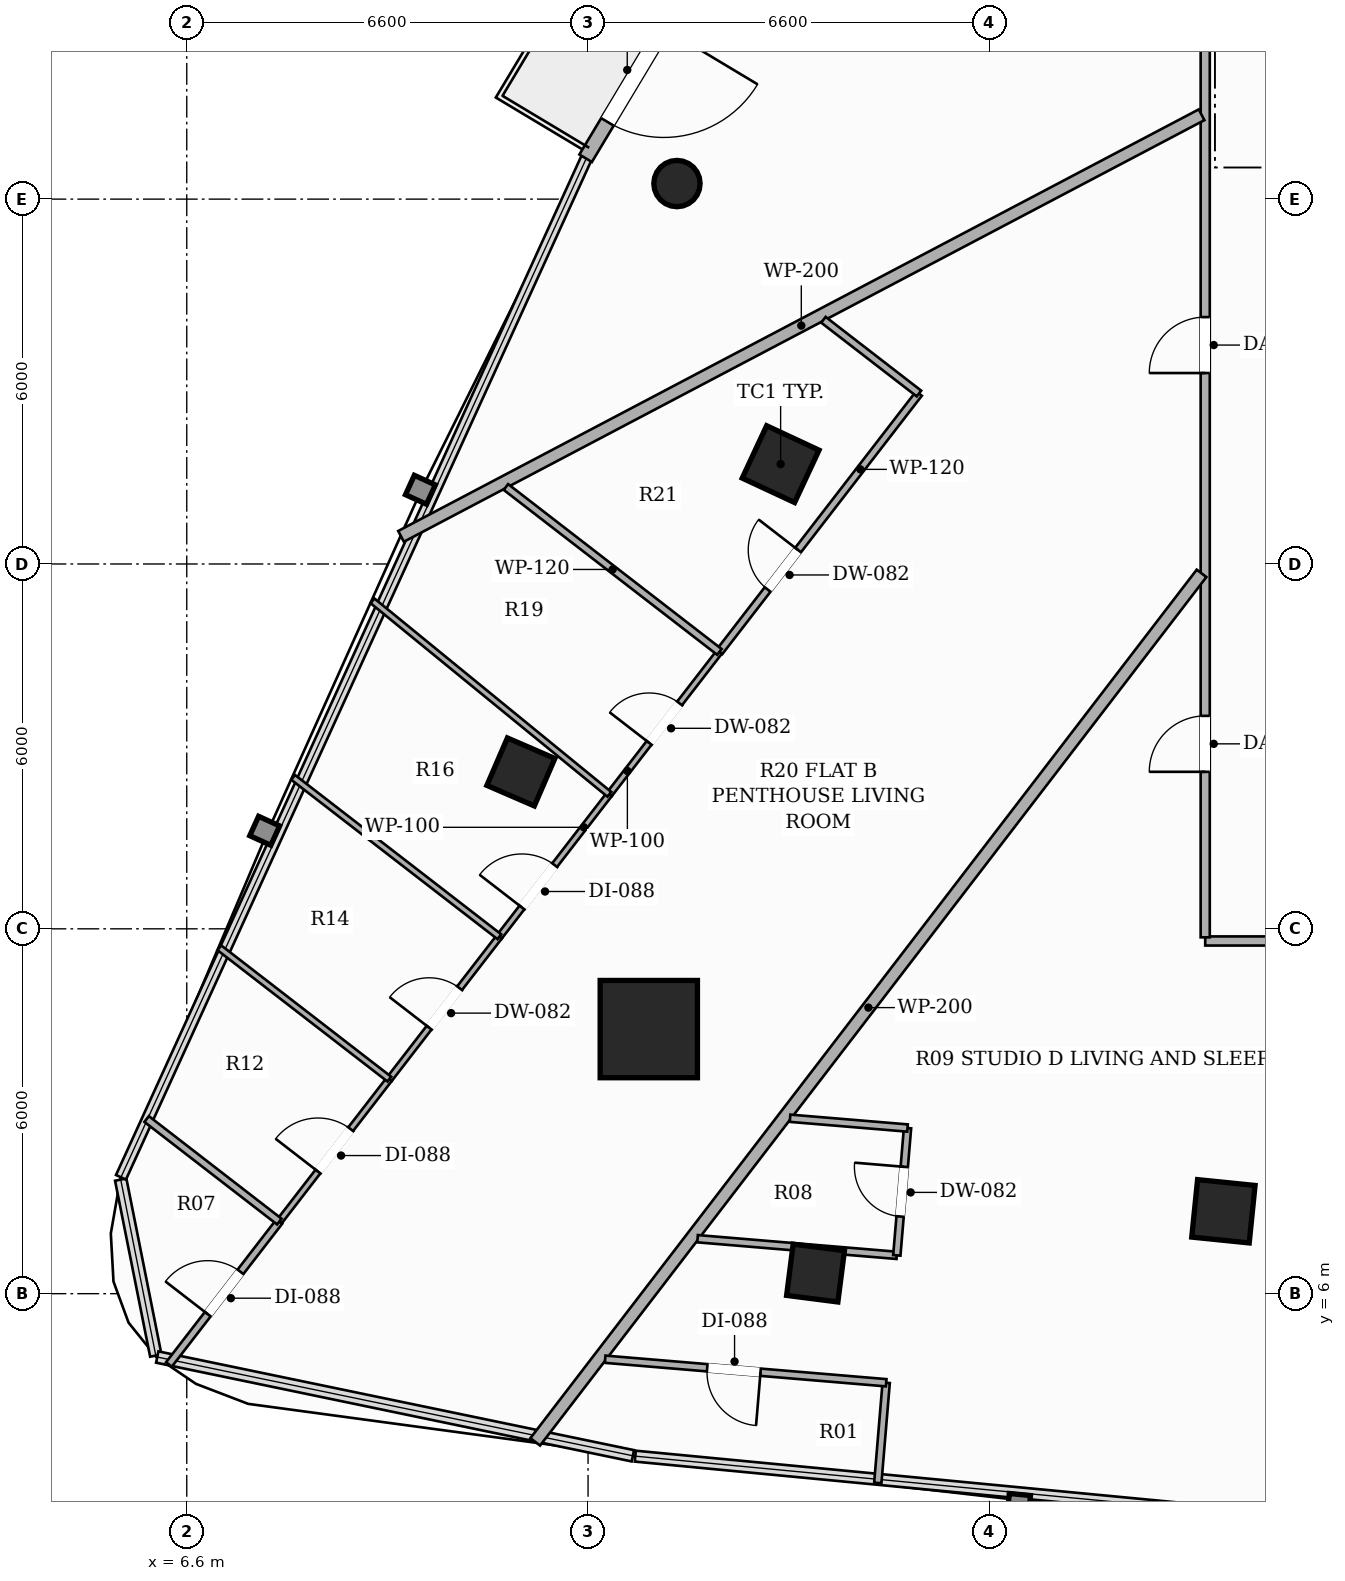
"""IFC4 building model, lengths in metres.
Left out: names, types, materials, properties, quantities, classifications, styles, units other than length and angle.
Written with IfcOpenShell. Run it as: python <this file> out.ifc"""

import sys

from ifc_helpers import new_model, si_unit, direction, frame, frame_2d, origin, origin_2d, place, context, subcontext, project, spatial, rectangle, hollow_rectangle, hollow_circle, extrude, element, fill, save


model = new_model("IFC4")
c1 = context("Model", 3, precision=1e-05, world=origin(), true_north=direction((0.0, 1.0)))
c2 = subcontext(c1, "Body", "Model", "MODEL_VIEW")
j1 = project(units=[si_unit("LENGTHUNIT", "METRE"), si_unit("PLANEANGLEUNIT", "RADIAN")], contexts=[c1])
p1 = place(None, origin())
s1 = spatial("IfcSite", under=j1, at=p1, CompositionType="ELEMENT")
p2 = place(p1, origin())
s2 = spatial("IfcBuilding", under=s1, at=p2, CompositionType="ELEMENT")
p3 = place(p2, frame((0.0, 0.0, 80.75)))
s3 = spatial("IfcBuildingStorey", under=s2, at=p3, CompositionType="ELEMENT", Elevation=80.75)
p4 = place(p3, frame((14.199, 10.351, 0.0), z_axis=(0.0, 0.0, 1.0), x_axis=(1.0, 0.0, 0.0)))
e1 = element("IfcColumn", 1, at=p4, inside=s3, PredefinedType="COLUMN", context=c2, shape_type="SweptSolid", body=[
    extrude(hollow_rectangle(XDim=1.6, YDim=1.6, WallThickness=0.05, at=origin_2d()), origin(), (0.0, 0.0, 1.0), 3.3),
])
for number, where, z_axis, x_axis in (
    (2, (16.367, 19.642, 0.0), (0.0, 0.0, 1.0), (0.423, 0.906, 0.0)),
    (3, (23.649, 7.355, 0.0), (0.0, 0.0, 1.0), (-0.995, 0.101, 0.0)),
):
    element("IfcColumn", number, at=place(p3, frame(where, z_axis=z_axis, x_axis=x_axis)), inside=s3, PredefinedType="COLUMN", context=c2, shape_type="SweptSolid", body=[
        extrude(hollow_rectangle(XDim=0.95, YDim=0.95, WallThickness=0.032, at=origin_2d()), origin(), (0.0, 0.0, 1.0), 3.3),
    ])
for number, where, z_axis, x_axis in (
    (4, (12.095, 14.58, 0.0), (0.0, 0.0, 1.0), (0.397, 0.918, 0.0)),
    (5, (16.941, 6.339, 0.0), (0.0, 0.0, 1.0), (-0.992, 0.127, 0.0)),
):
    element("IfcColumn", number, at=place(p3, frame(where, z_axis=z_axis, x_axis=x_axis)), inside=s3, PredefinedType="COLUMN", context=c2, shape_type="SweptSolid", body=[
        extrude(hollow_rectangle(XDim=0.85, YDim=0.85, WallThickness=0.028, at=origin_2d()), origin(), (0.0, 0.0, 1.0), 3.3),
    ])
p5 = place(p3, frame((14.662, 24.256, 0.0), z_axis=(0.0, 0.0, 1.0), x_axis=(1.0, 0.0, 0.0)))
e6 = element("IfcColumn", 6, at=p5, inside=s3, PredefinedType="COLUMN", context=c2, shape_type="SweptSolid", body=[
    extrude(hollow_circle(Radius=0.381, WallThickness=0.022, at=origin_2d()), origin(), (0.0, 0.0, 1.0), 3.3),
])
p6 = place(p3, frame((19.576, 35.37, 0.0), z_axis=(0.0, 0.0, 1.0), x_axis=(-0.514331693128, -0.85759134175, 0.0)))
e7 = element("IfcWall", 7, at=p6, inside=s3, PredefinedType="SOLIDWALL", context=c2, shape_type="SweptSolid", body=[
    extrude(rectangle(XDim=12.474, YDim=0.24, at=frame_2d((6.237, 0.0))), origin(), (0.0, 0.0, 1.0), 2.624),
])
p7 = place(p6, frame((9.977, 0.0, 0.0)))
e8 = element("IfcOpeningElement", 8, at=p7, cuts=e7, PredefinedType="OPENING", context=c2, shape_type="SweptSolid", body=[
    extrude(rectangle(XDim=1.8, YDim=2.2, at=frame_2d((0.9, 1.1))), frame((0.0, 0.13, 0.0), z_axis=(0.0, -1.0, 0.0), x_axis=(1.0, 0.0, 0.0)), (0.0, 0.0, 1.0), 0.26),
])
p8 = place(p3, frame((42.59, 11.8, 0.0), z_axis=(0.0, 0.0, 1.0), x_axis=(-1.0, 0.0, 0.0)))
e9 = element("IfcWall", 9, at=p8, inside=s3, PredefinedType="PARTITIONING", context=c2, shape_type="SweptSolid", body=[
    extrude(rectangle(XDim=19.24, YDim=0.15, at=frame_2d((9.62, 0.0))), origin(), (0.0, 0.0, 1.0), 2.669),
])
p9 = place(p8, frame((9.24, 0.0, 0.0)))
e10 = element("IfcOpeningElement", 10, at=p9, cuts=e9, PredefinedType="OPENING", context=c2, shape_type="SweptSolid", body=[
    extrude(rectangle(XDim=0.88, YDim=2.1, at=frame_2d((0.44, 1.05))), frame((0.0, 0.085, 0.0), z_axis=(0.0, -1.0, 0.0), x_axis=(1.0, 0.0, 0.0)), (0.0, 0.0, 1.0), 0.17),
])
p10 = place(p8, frame((2.174, 0.0, 0.0)))
e11 = element("IfcOpeningElement", 11, at=p10, cuts=e9, PredefinedType="OPENING", context=c2, shape_type="SweptSolid", body=[
    extrude(rectangle(XDim=0.88, YDim=2.1, at=frame_2d((0.44, 1.05))), frame((0.0, 0.085, 0.0), z_axis=(0.0, -1.0, 0.0), x_axis=(1.0, 0.0, 0.0)), (0.0, 0.0, 1.0), 0.17),
])
p11 = place(p3, frame((23.35, 11.86, 0.0), z_axis=(0.0, 0.0, 1.0), x_axis=(0.0, 1.0, 0.0)))
e12 = element("IfcWall", 12, at=p11, inside=s3, PredefinedType="PARTITIONING", context=c2, shape_type="SweptSolid", body=[
    extrude(rectangle(XDim=25.04, YDim=0.15, at=frame_2d((12.52, 0.0))), origin(), (0.0, 0.0, 1.0), 2.413),
])
p12 = place(p11, frame((18.695, 0.0, 0.0)))
e13 = element("IfcOpeningElement", 13, at=p12, cuts=e12, PredefinedType="OPENING", context=c2, shape_type="SweptSolid", body=[
    extrude(rectangle(XDim=0.88, YDim=2.1, at=frame_2d((0.44, 1.05))), frame((0.0, 0.085, 0.0), z_axis=(0.0, -1.0, 0.0), x_axis=(1.0, 0.0, 0.0)), (0.0, 0.0, 1.0), 0.17),
])
p13 = place(p11, frame((9.28, 0.0, 0.0)))
e14 = element("IfcOpeningElement", 14, at=p13, cuts=e12, PredefinedType="OPENING", context=c2, shape_type="SweptSolid", body=[
    extrude(rectangle(XDim=0.92, YDim=2.15, at=frame_2d((0.46, 1.075))), frame((0.0, 0.085, 0.0), z_axis=(0.0, -1.0, 0.0), x_axis=(1.0, 0.0, 0.0)), (0.0, 0.0, 1.0), 0.17),
])
p14 = place(p11, frame((2.722, 0.0, 0.0)))
e15 = element("IfcOpeningElement", 15, at=p14, cuts=e12, PredefinedType="OPENING", context=c2, shape_type="SweptSolid", body=[
    extrude(rectangle(XDim=0.92, YDim=2.15, at=frame_2d((0.46, 1.075))), frame((0.0, 0.085, 0.0), z_axis=(0.0, -1.0, 0.0), x_axis=(1.0, 0.0, 0.0)), (0.0, 0.0, 1.0), 0.17),
])
p15 = place(p3, frame((23.29, 25.387, 0.0), z_axis=(0.0, 0.0, 1.0), x_axis=(-0.884824599801, -0.465924272373, 0.0)))
e16 = element("IfcWall", 16, at=p15, inside=s3, PredefinedType="PARTITIONING", context=c2, shape_type="SweptSolid", body=[
    extrude(rectangle(XDim=14.88, YDim=0.2, at=frame_2d((7.44, 0.0))), origin(), (0.0, 0.0, 1.0), 2.413),
])
p16 = place(p3, frame((23.29, 17.846, 0.0), z_axis=(0.0, 0.0, 1.0), x_axis=(-0.608736412859, -0.793372535232, 0.0)))
e17 = element("IfcWall", 17, at=p16, inside=s3, PredefinedType="PARTITIONING", context=c2, shape_type="SweptSolid", body=[
    extrude(rectangle(XDim=18.003, YDim=0.2, at=frame_2d((9.001, 0.0))), origin(), (0.0, 0.0, 1.0), 2.413),
])
p17 = place(p3, frame((15.36, 16.554, 0.0), z_axis=(0.0, 0.0, 1.0), x_axis=(0.611289599194, 0.791406991324, 0.0)))
e18 = element("IfcWall", 18, at=p17, inside=s3, PredefinedType="PARTITIONING", context=c2, shape_type="SweptSolid", body=[
    extrude(rectangle(XDim=5.369, YDim=0.12, at=frame_2d((2.685, 0.0))), origin(), (0.0, 0.0, 1.0), 2.669),
])
p18 = place(p17, frame((1.297, 0.0, 0.0)))
e19 = element("IfcOpeningElement", 19, at=p18, cuts=e18, PredefinedType="OPENING", context=c2, shape_type="SweptSolid", body=[
    extrude(rectangle(XDim=0.82, YDim=2.1, at=frame_2d((0.41, 1.05))), frame((0.0, 0.07, 0.0), z_axis=(0.0, -1.0, 0.0), x_axis=(1.0, 0.0, 0.0)), (0.0, 0.0, 1.0), 0.14),
])
p19 = place(p3, frame((18.642, 20.803, 0.0), z_axis=(0.0, 0.0, 1.0), x_axis=(-0.791493240875, 0.611177919799, 0.0)))
e20 = element("IfcWall", 20, at=p19, inside=s3, PredefinedType="PARTITIONING", context=c2, shape_type="SweptSolid", body=[
    extrude(rectangle(XDim=1.985, YDim=0.12, at=frame_2d((0.992, 0.0))), origin(), (0.0, 0.0, 1.0), 2.669),
])
p20 = place(p3, frame((6.307, 4.836, 0.0), z_axis=(0.0, 0.0, 1.0), x_axis=(0.611279012709, 0.791415168304, 0.0)))
e21 = element("IfcWall", 21, at=p20, inside=s3, PredefinedType="PARTITIONING", context=c2, shape_type="SweptSolid", body=[
    extrude(rectangle(XDim=2.969, YDim=0.12, at=frame_2d((1.485, 0.0))), origin(), (0.0, 0.0, 1.0), 3.06),
])
p21 = place(p20, frame((1.045, 0.0, 0.0)))
e22 = element("IfcOpeningElement", 22, at=p21, cuts=e21, PredefinedType="OPENING", context=c2, shape_type="SweptSolid", body=[
    extrude(rectangle(XDim=0.88, YDim=2.1, at=frame_2d((0.44, 1.05))), frame((0.0, 0.07, 0.0), z_axis=(0.0, -1.0, 0.0), x_axis=(1.0, 0.0, 0.0)), (0.0, 0.0, 1.0), 0.14),
])
p22 = place(p3, frame((11.741, 11.87, 0.0), z_axis=(0.0, 0.0, 1.0), x_axis=(0.61134418085, 0.791364828976, 0.0)))
e23 = element("IfcWall", 23, at=p22, inside=s3, PredefinedType="PARTITIONING", context=c2, shape_type="SweptSolid", body=[
    extrude(rectangle(XDim=2.959, YDim=0.1, at=frame_2d((1.479, 0.0))), origin(), (0.0, 0.0, 1.0), 2.413),
])
p23 = place(p22, frame((0.608, 0.0, 0.0)))
e24 = element("IfcOpeningElement", 24, at=p23, cuts=e23, PredefinedType="OPENING", context=c2, shape_type="SweptSolid", body=[
    extrude(rectangle(XDim=0.88, YDim=2.1, at=frame_2d((0.44, 1.05))), frame((0.0, 0.06, 0.0), z_axis=(0.0, -1.0, 0.0), x_axis=(1.0, 0.0, 0.0)), (0.0, 0.0, 1.0), 0.12),
])
p24 = place(p3, frame((13.55, 14.212, 0.0), z_axis=(0.0, 0.0, 1.0), x_axis=(0.611510880037, 0.791236022686, 0.0)))
e25 = element("IfcWall", 25, at=p24, inside=s3, PredefinedType="PARTITIONING", context=c2, shape_type="SweptSolid", body=[
    extrude(rectangle(XDim=2.96, YDim=0.1, at=frame_2d((1.48, 0.0))), origin(), (0.0, 0.0, 1.0), 3.06),
])
p25 = place(p24, frame((1.07, 0.0, 0.0)))
e26 = element("IfcOpeningElement", 26, at=p25, cuts=e25, PredefinedType="OPENING", context=c2, shape_type="SweptSolid", body=[
    extrude(rectangle(XDim=0.82, YDim=2.1, at=frame_2d((0.41, 1.05))), frame((0.0, 0.06, 0.0), z_axis=(0.0, -1.0, 0.0), x_axis=(1.0, 0.0, 0.0)), (0.0, 0.0, 1.0), 0.12),
])
p26 = place(p3, frame((9.932, 9.528, 0.0), z_axis=(0.0, 0.0, 1.0), x_axis=(0.611304268233, 0.791395660615, 0.0)))
e27 = element("IfcWall", 27, at=p26, inside=s3, PredefinedType="PARTITIONING", context=c2, shape_type="SweptSolid", body=[
    extrude(rectangle(XDim=2.959, YDim=0.1, at=frame_2d((1.48, 0.0))), origin(), (0.0, 0.0, 1.0), 2.619),
])
p27 = place(p26, frame((1.07, 0.0, 0.0)))
e28 = element("IfcOpeningElement", 28, at=p27, cuts=e27, PredefinedType="OPENING", context=c2, shape_type="SweptSolid", body=[
    extrude(rectangle(XDim=0.82, YDim=2.1, at=frame_2d((0.41, 1.05))), frame((0.0, 0.06, 0.0), z_axis=(0.0, -1.0, 0.0), x_axis=(1.0, 0.0, 0.0)), (0.0, 0.0, 1.0), 0.12),
])
p28 = place(p3, frame((8.122, 7.186, 0.0), z_axis=(0.0, 0.0, 1.0), x_axis=(0.611459238808, 0.791275931187, 0.0)))
e29 = element("IfcWall", 29, at=p28, inside=s3, PredefinedType="PARTITIONING", context=c2, shape_type="SweptSolid", body=[
    extrude(rectangle(XDim=2.96, YDim=0.1, at=frame_2d((1.48, 0.0))), origin(), (0.0, 0.0, 1.0), 3.06),
])
p29 = place(p28, frame((1.04, 0.0, 0.0)))
e30 = element("IfcOpeningElement", 30, at=p29, cuts=e29, PredefinedType="OPENING", context=c2, shape_type="SweptSolid", body=[
    extrude(rectangle(XDim=0.88, YDim=2.1, at=frame_2d((0.44, 1.05))), frame((0.0, 0.06, 0.0), z_axis=(0.0, -1.0, 0.0), x_axis=(1.0, 0.0, 0.0)), (0.0, 0.0, 1.0), 0.12),
])
p30 = place(p3, frame((15.36, 16.554, 0.0), z_axis=(0.0, 0.0, 1.0), x_axis=(-0.79138059941, 0.611323766, 0.0)))
e31 = element("IfcWall", 31, at=p30, inside=s3, PredefinedType="PARTITIONING", context=c2, shape_type="SweptSolid", body=[
    extrude(rectangle(XDim=4.437, YDim=0.12, at=frame_2d((2.218, 0.0))), origin(), (0.0, 0.0, 1.0), 2.413),
])
p31 = place(p3, frame((5.94, 8.872, 0.0), z_axis=(0.0, 0.0, 1.0), x_axis=(0.791312259297, -0.611412224514, 0.0)))
e32 = element("IfcWall", 32, at=p31, inside=s3, PredefinedType="PARTITIONING", context=c2, shape_type="SweptSolid", body=[
    extrude(rectangle(XDim=2.758, YDim=0.12, at=frame_2d((1.379, 0.0))), origin(), (0.0, 0.0, 1.0), 3.06),
])
p32 = place(p3, frame((9.654, 17.394, 0.0), z_axis=(0.0, 0.0, 1.0), x_axis=(0.774493289837, -0.63258212431, 0.0)))
e33 = element("IfcWall", 33, at=p32, inside=s3, PredefinedType="PARTITIONING", context=c2, shape_type="SweptSolid", body=[
    extrude(rectangle(XDim=5.03, YDim=0.1, at=frame_2d((2.515, 0.0))), origin(), (0.0, 0.0, 1.0), 2.413),
])
p33 = place(p3, frame((11.741, 11.87, 0.0), z_axis=(0.0, 0.0, 1.0), x_axis=(-0.791298779838, 0.61142966973, 0.0)))
e34 = element("IfcWall", 34, at=p33, inside=s3, PredefinedType="PARTITIONING", context=c2, shape_type="SweptSolid", body=[
    extrude(rectangle(XDim=4.286, YDim=0.1, at=frame_2d((2.143, 0.0))), origin(), (0.0, 0.0, 1.0), 3.06),
])
p34 = place(p3, frame((9.932, 9.528, 0.0), z_axis=(0.0, 0.0, 1.0), x_axis=(-0.791360981132, 0.611349161725, 0.0)))
e35 = element("IfcWall", 35, at=p34, inside=s3, PredefinedType="PARTITIONING", context=c2, shape_type="SweptSolid", body=[
    extrude(rectangle(XDim=3.533, YDim=0.1, at=frame_2d((1.767, 0.0))), origin(), (0.0, 0.0, 1.0), 3.06),
])
p35 = place(p3, frame((15.001, 6.904, 0.0), z_axis=(0.0, 0.0, 1.0), x_axis=(0.996518569178, -0.083371105803, 0.0)))
e36 = element("IfcWall", 36, at=p35, inside=s3, PredefinedType="PARTITIONING", context=c2, shape_type="SweptSolid", body=[
    extrude(rectangle(XDim=3.289, YDim=0.12, at=frame_2d((1.644, 0.0))), origin(), (0.0, 0.0, 1.0), 2.413),
])
p36 = place(p3, frame((18.278, 6.63, 0.0), z_axis=(0.0, 0.0, 1.0), x_axis=(0.083756885487, 0.996486218737, 0.0)))
e37 = element("IfcWall", 37, at=p36, inside=s3, PredefinedType="PARTITIONING", context=c2, shape_type="SweptSolid", body=[
    extrude(rectangle(XDim=2.102, YDim=0.12, at=frame_2d((1.051, 0.0))), origin(), (0.0, 0.0, 1.0), 2.413),
])
p37 = place(p36, frame((0.641, 0.0, 0.0)))
e38 = element("IfcOpeningElement", 38, at=p37, cuts=e37, PredefinedType="OPENING", context=c2, shape_type="SweptSolid", body=[
    extrude(rectangle(XDim=0.82, YDim=2.1, at=frame_2d((0.41, 1.05))), frame((0.0, 0.07, 0.0), z_axis=(0.0, -1.0, 0.0), x_axis=(1.0, 0.0, 0.0)), (0.0, 0.0, 1.0), 0.14),
])
p38 = place(p3, frame((18.454, 8.724, 0.0), z_axis=(0.0, 0.0, 1.0), x_axis=(-0.996550966871, 0.082982952637, 0.0)))
e39 = element("IfcWall", 39, at=p38, inside=s3, PredefinedType="PARTITIONING", context=c2, shape_type="SweptSolid", body=[
    extrude(rectangle(XDim=1.939, YDim=0.12, at=frame_2d((0.969, 0.0))), origin(), (0.0, 0.0, 1.0), 2.669),
])
p39 = place(p3, frame((17.965, 2.887, 0.0), z_axis=(0.0, 0.0, 1.0), x_axis=(0.083412008543, 0.996515146313, 0.0)))
e40 = element("IfcWall", 40, at=p39, inside=s3, PredefinedType="PARTITIONING", context=c2, shape_type="SweptSolid", body=[
    extrude(rectangle(XDim=1.654, YDim=0.12, at=frame_2d((0.827, 0.0))), origin(), (0.0, 0.0, 1.0), 2.619),
])
p40 = place(p3, frame((18.103, 4.535, 0.0), z_axis=(0.0, 0.0, 1.0), x_axis=(-0.99650936218, 0.083481082211, 0.0)))
e41 = element("IfcWall", 41, at=p40, inside=s3, PredefinedType="PARTITIONING", context=c2, shape_type="SweptSolid", body=[
    extrude(rectangle(XDim=4.638, YDim=0.12, at=frame_2d((2.319, 0.0))), origin(), (0.0, 0.0, 1.0), 2.619),
])
p41 = place(p40, frame((2.074, 0.0, 0.0)))
e42 = element("IfcOpeningElement", 42, at=p41, cuts=e41, PredefinedType="OPENING", context=c2, shape_type="SweptSolid", body=[
    extrude(rectangle(XDim=0.88, YDim=2.1, at=frame_2d((0.44, 1.05))), frame((0.0, 0.07, 0.0), z_axis=(0.0, -1.0, 0.0), x_axis=(1.0, 0.0, 0.0)), (0.0, 0.0, 1.0), 0.14),
])
p42 = place(p7, origin())
e43 = element("IfcDoor", 43, at=p42, inside=s3, OperationType="SINGLE_SWING_LEFT", PredefinedType="DOOR", context=c2, shape_type="SweptSolid", body=[
    extrude(rectangle(XDim=1.8, YDim=2.2, at=frame_2d((0.9, 1.1))), frame((0.0, 0.025, 0.0), z_axis=(0.0, -1.0, 0.0), x_axis=(1.0, 0.0, 0.0)), (0.0, 0.0, 1.0), 0.05),
])
fill(e8, e43)
p43 = place(p13, origin())
e44 = element("IfcDoor", 44, at=p43, inside=s3, OperationType="SINGLE_SWING_LEFT", PredefinedType="DOOR", context=c2, shape_type="SweptSolid", body=[
    extrude(rectangle(XDim=0.92, YDim=2.15, at=frame_2d((0.46, 1.075))), frame((0.0, 0.025, 0.0), z_axis=(0.0, -1.0, 0.0), x_axis=(1.0, 0.0, 0.0)), (0.0, 0.0, 1.0), 0.05),
])
fill(e14, e44)
p44 = place(p18, origin())
e45 = element("IfcDoor", 45, at=p44, inside=s3, OperationType="SINGLE_SWING_RIGHT", PredefinedType="DOOR", context=c2, shape_type="SweptSolid", body=[
    extrude(rectangle(XDim=0.82, YDim=2.1, at=frame_2d((0.41, 1.05))), frame((0.0, 0.025, 0.0), z_axis=(0.0, -1.0, 0.0), x_axis=(1.0, 0.0, 0.0)), (0.0, 0.0, 1.0), 0.05),
])
fill(e19, e45)
p45 = place(p21, origin())
e46 = element("IfcDoor", 46, at=p45, inside=s3, OperationType="SINGLE_SWING_LEFT", PredefinedType="DOOR", context=c2, shape_type="SweptSolid", body=[
    extrude(rectangle(XDim=0.88, YDim=2.1, at=frame_2d((0.44, 1.05))), frame((0.0, 0.025, 0.0), z_axis=(0.0, -1.0, 0.0), x_axis=(1.0, 0.0, 0.0)), (0.0, 0.0, 1.0), 0.05),
])
fill(e22, e46)
p46 = place(p23, origin())
e47 = element("IfcDoor", 47, at=p46, inside=s3, OperationType="SINGLE_SWING_LEFT", PredefinedType="DOOR", context=c2, shape_type="SweptSolid", body=[
    extrude(rectangle(XDim=0.88, YDim=2.1, at=frame_2d((0.44, 1.05))), frame((0.0, 0.025, 0.0), z_axis=(0.0, -1.0, 0.0), x_axis=(1.0, 0.0, 0.0)), (0.0, 0.0, 1.0), 0.05),
])
fill(e24, e47)
p47 = place(p25, origin())
e48 = element("IfcDoor", 48, at=p47, inside=s3, OperationType="SINGLE_SWING_LEFT", PredefinedType="DOOR", context=c2, shape_type="SweptSolid", body=[
    extrude(rectangle(XDim=0.82, YDim=2.1, at=frame_2d((0.41, 1.05))), frame((0.0, 0.025, 0.0), z_axis=(0.0, -1.0, 0.0), x_axis=(1.0, 0.0, 0.0)), (0.0, 0.0, 1.0), 0.05),
])
fill(e26, e48)
p48 = place(p27, origin())
e49 = element("IfcDoor", 49, at=p48, inside=s3, OperationType="SINGLE_SWING_LEFT", PredefinedType="DOOR", context=c2, shape_type="SweptSolid", body=[
    extrude(rectangle(XDim=0.82, YDim=2.1, at=frame_2d((0.41, 1.05))), frame((0.0, 0.025, 0.0), z_axis=(0.0, -1.0, 0.0), x_axis=(1.0, 0.0, 0.0)), (0.0, 0.0, 1.0), 0.05),
])
fill(e28, e49)
p49 = place(p29, origin())
e50 = element("IfcDoor", 50, at=p49, inside=s3, OperationType="SINGLE_SWING_LEFT", PredefinedType="DOOR", context=c2, shape_type="SweptSolid", body=[
    extrude(rectangle(XDim=0.88, YDim=2.1, at=frame_2d((0.44, 1.05))), frame((0.0, 0.025, 0.0), z_axis=(0.0, -1.0, 0.0), x_axis=(1.0, 0.0, 0.0)), (0.0, 0.0, 1.0), 0.05),
])
fill(e30, e50)
p50 = place(p14, origin())
e51 = element("IfcDoor", 51, at=p50, inside=s3, OperationType="SINGLE_SWING_LEFT", PredefinedType="DOOR", context=c2, shape_type="SweptSolid", body=[
    extrude(rectangle(XDim=0.92, YDim=2.15, at=frame_2d((0.46, 1.075))), frame((0.0, 0.025, 0.0), z_axis=(0.0, -1.0, 0.0), x_axis=(1.0, 0.0, 0.0)), (0.0, 0.0, 1.0), 0.05),
])
fill(e15, e51)
p51 = place(p37, origin())
e52 = element("IfcDoor", 52, at=p51, inside=s3, OperationType="SINGLE_SWING_RIGHT", PredefinedType="DOOR", context=c2, shape_type="SweptSolid", body=[
    extrude(rectangle(XDim=0.82, YDim=2.1, at=frame_2d((0.41, 1.05))), frame((0.0, 0.025, 0.0), z_axis=(0.0, -1.0, 0.0), x_axis=(1.0, 0.0, 0.0)), (0.0, 0.0, 1.0), 0.05),
])
fill(e38, e52)
p52 = place(p41, origin())
e53 = element("IfcDoor", 53, at=p52, inside=s3, OperationType="SINGLE_SWING_LEFT", PredefinedType="DOOR", context=c2, shape_type="SweptSolid", body=[
    extrude(rectangle(XDim=0.88, YDim=2.1, at=frame_2d((0.44, 1.05))), frame((0.0, 0.025, 0.0), z_axis=(0.0, -1.0, 0.0), x_axis=(1.0, 0.0, 0.0)), (0.0, 0.0, 1.0), 0.05),
])
fill(e42, e53)
save(model, sys.argv[1])
